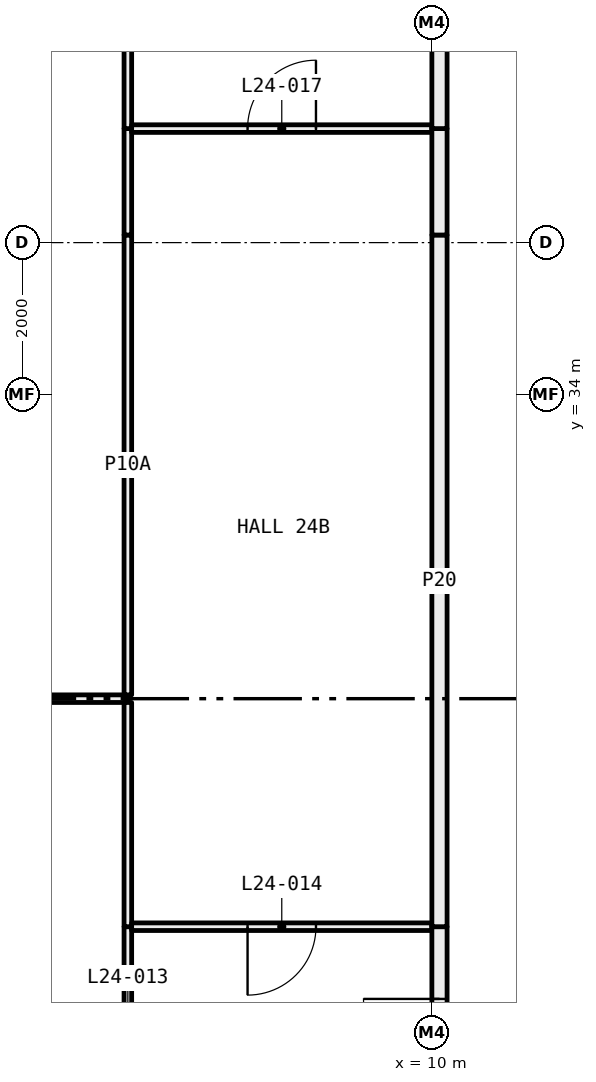
"""IFC4 building model, lengths in metres.
Left out: names, types, materials, properties, quantities, classifications, styles, units other than length and angle.
Written with IfcOpenShell. Run it as: python <this file> out.ifc"""

import sys

from ifc_helpers import new_model, si_unit, direction, frame, frame_2d, origin, place, context, subcontext, project, spatial, rectangle, extrude, element, fill, save


model = new_model("IFC4")
c1 = context("Model", 3, precision=1e-05, world=origin(), true_north=direction((0.0, 1.0)))
c2 = subcontext(c1, "Body", "Model", "MODEL_VIEW")
j1 = project(units=[si_unit("LENGTHUNIT", "METRE"), si_unit("PLANEANGLEUNIT", "RADIAN")], contexts=[c1])
p1 = place(None, origin())
s1 = spatial("IfcSite", under=j1, at=p1, CompositionType="ELEMENT")
p2 = place(p1, origin())
s2 = spatial("IfcBuilding", under=s1, at=p2, CompositionType="ELEMENT")
p3 = place(p2, frame((0.0, 0.0, 96.6)))
s3 = spatial("IfcBuildingStorey", under=s2, at=p3, CompositionType="ELEMENT", Elevation=96.6)
p4 = place(p3, frame((6.0, 30.0, 0.0), z_axis=(0.0, 0.0, 1.0), x_axis=(-1.0, 0.0, 0.0)))
e1 = element("IfcWall", 1, at=p4, inside=s3, PredefinedType="PARTITIONING", context=c2, shape_type="SweptSolid", body=[
    extrude(rectangle(XDim=5.28, YDim=0.1, at=frame_2d((2.64, 0.0))), origin(), (0.0, 0.0, 1.0), 3.05),
])
p5 = place(p4, frame((2.19, 0.0, 0.0)))
e2 = element("IfcOpeningElement", 2, at=p5, cuts=e1, PredefinedType="OPENING", context=c2, shape_type="SweptSolid", body=[
    extrude(rectangle(XDim=0.9, YDim=2.1, at=frame_2d((0.45, 1.05))), frame((0.0, 0.06, 0.0), z_axis=(0.0, -1.0, 0.0), x_axis=(1.0, 0.0, 0.0)), (0.0, 0.0, 1.0), 0.12),
])
p6 = place(p3, frame((6.0, 24.05, 0.0), z_axis=(0.0, 0.0, 1.0), x_axis=(0.0, 1.0, 0.0)))
e3 = element("IfcWall", 3, at=p6, inside=s3, PredefinedType="PARTITIONING", context=c2, shape_type="SweptSolid", body=[
    extrude(rectangle(XDim=2.95, YDim=0.1, at=frame_2d((1.475, 0.0))), origin(), (0.0, 0.0, 1.0), 2.45),
])
p7 = place(p6, frame((1.025, 0.0, 0.0)))
e4 = element("IfcOpeningElement", 4, at=p7, cuts=e3, PredefinedType="OPENING", context=c2, shape_type="SweptSolid", body=[
    extrude(rectangle(XDim=0.9, YDim=2.1, at=frame_2d((0.45, 1.05))), frame((0.0, 0.06, 0.0), z_axis=(0.0, -1.0, 0.0), x_axis=(1.0, 0.0, 0.0)), (0.0, 0.0, 1.0), 0.12),
])
p8 = place(p3, frame((6.0, 27.0, 0.0), z_axis=(0.0, 0.0, 1.0), x_axis=(0.0, 1.0, 0.0)))
e5 = element("IfcWall", 5, at=p8, inside=s3, PredefinedType="PARTITIONING", context=c2, shape_type="SweptSolid", body=[
    extrude(rectangle(XDim=2.95, YDim=0.1, at=frame_2d((1.475, 0.0))), origin(), (0.0, 0.0, 1.0), 3.05),
])
p9 = place(p3, frame((6.0, 30.05, 0.0), z_axis=(0.0, 0.0, 1.0), x_axis=(0.0, 1.0, 0.0)))
e6 = element("IfcWall", 6, at=p9, inside=s3, PredefinedType="PARTITIONING", context=c2, shape_type="SweptSolid", body=[
    extrude(rectangle(XDim=6.05, YDim=0.1, at=frame_2d((3.025, 0.0))), origin(), (0.0, 0.0, 1.0), 2.45),
])
p10 = place(p3, frame((6.0, 36.1, 0.0), z_axis=(0.0, 0.0, 1.0), x_axis=(0.0, 1.0, 0.0)))
e7 = element("IfcWall", 7, at=p10, inside=s3, PredefinedType="PARTITIONING", context=c2, shape_type="SweptSolid", body=[
    extrude(rectangle(XDim=1.4, YDim=0.1, at=frame_2d((0.7, 0.0))), origin(), (0.0, 0.0, 1.0), 3.05),
])
p11 = place(p3, frame((6.0, 37.5, 0.0), z_axis=(0.0, 0.0, 1.0), x_axis=(0.0, 1.0, 0.0)))
e8 = element("IfcWall", 8, at=p11, inside=s3, PredefinedType="PARTITIONING", context=c2, shape_type="SweptSolid", body=[
    extrude(rectangle(XDim=3.78, YDim=0.1, at=frame_2d((1.89, 0.0))), origin(), (0.0, 0.0, 1.0), 3.05),
])
p12 = place(p3, frame((10.0, 27.0, 0.0), z_axis=(0.0, 0.0, 1.0), x_axis=(-1.0, 0.0, 0.0)))
e9 = element("IfcWall", 9, at=p12, inside=s3, PredefinedType="PARTITIONING", context=c2, shape_type="SweptSolid", body=[
    extrude(rectangle(XDim=3.95, YDim=0.1, at=frame_2d((1.975, 0.0))), origin(), (0.0, 0.0, 1.0), 3.05),
])
p13 = place(p12, frame((1.525, 0.0, 0.0)))
e10 = element("IfcOpeningElement", 10, at=p13, cuts=e9, PredefinedType="OPENING", context=c2, shape_type="SweptSolid", body=[
    extrude(rectangle(XDim=0.9, YDim=2.1, at=frame_2d((0.45, 1.05))), frame((0.0, 0.06, 0.0), z_axis=(0.0, -1.0, 0.0), x_axis=(1.0, 0.0, 0.0)), (0.0, 0.0, 1.0), 0.12),
])
p14 = place(p3, frame((10.1, 24.1, 0.0), z_axis=(0.0, 0.0, 1.0), x_axis=(0.0, 1.0, 0.0)))
e11 = element("IfcWall", 11, at=p14, inside=s3, PredefinedType="PARTITIONING", context=c2, shape_type="SweptSolid", body=[
    extrude(rectangle(XDim=2.9, YDim=0.2, at=frame_2d((1.45, 0.0))), origin(), (0.0, 0.0, 1.0), 3.05),
])
p15 = place(p14, frame((0.95, 0.0, 0.0)))
e12 = element("IfcOpeningElement", 12, at=p15, cuts=e11, PredefinedType="OPENING", context=c2, shape_type="SweptSolid", body=[
    extrude(rectangle(XDim=1.0, YDim=2.1, at=frame_2d((0.5, 1.05))), frame((0.0, 0.11, 0.0), z_axis=(0.0, -1.0, 0.0), x_axis=(1.0, 0.0, 0.0)), (0.0, 0.0, 1.0), 0.22),
])
p16 = place(p3, frame((10.0, 37.5, 0.0), z_axis=(0.0, 0.0, 1.0), x_axis=(-1.0, 0.0, 0.0)))
e13 = element("IfcWall", 13, at=p16, inside=s3, PredefinedType="PARTITIONING", context=c2, shape_type="SweptSolid", body=[
    extrude(rectangle(XDim=3.95, YDim=0.1, at=frame_2d((1.975, 0.0))), origin(), (0.0, 0.0, 1.0), 3.05),
])
p17 = place(p16, frame((1.525, 0.0, 0.0)))
e14 = element("IfcOpeningElement", 14, at=p17, cuts=e13, PredefinedType="OPENING", context=c2, shape_type="SweptSolid", body=[
    extrude(rectangle(XDim=0.9, YDim=2.1, at=frame_2d((0.45, 1.05))), frame((0.0, 0.06, 0.0), z_axis=(0.0, -1.0, 0.0), x_axis=(1.0, 0.0, 0.0)), (0.0, 0.0, 1.0), 0.12),
])
p18 = place(p3, frame((10.1, 27.0, 0.0), z_axis=(0.0, 0.0, 1.0), x_axis=(0.0, 1.0, 0.0)))
e15 = element("IfcWall", 15, at=p18, inside=s3, PredefinedType="PARTITIONING", context=c2, shape_type="SweptSolid", body=[
    extrude(rectangle(XDim=9.1, YDim=0.2, at=frame_2d((4.55, 0.0))), origin(), (0.0, 0.0, 1.0), 2.45),
])
p19 = place(p3, frame((10.1, 36.1, 0.0), z_axis=(0.0, 0.0, 1.0), x_axis=(0.0, 1.0, 0.0)))
e16 = element("IfcWall", 16, at=p19, inside=s3, PredefinedType="PARTITIONING", context=c2, shape_type="SweptSolid", body=[
    extrude(rectangle(XDim=1.4, YDim=0.2, at=frame_2d((0.7, 0.0))), origin(), (0.0, 0.0, 1.0), 3.05),
])
p20 = place(p3, frame((10.1, 37.5, 0.0), z_axis=(0.0, 0.0, 1.0), x_axis=(0.0, 1.0, 0.0)))
e17 = element("IfcWall", 17, at=p20, inside=s3, PredefinedType="PARTITIONING", context=c2, shape_type="SweptSolid", body=[
    extrude(rectangle(XDim=4.4, YDim=0.2, at=frame_2d((2.2, 0.0))), origin(), (0.0, 0.0, 1.0), 3.05),
])
p21 = place(p15, origin())
e18 = element("IfcDoor", 18, at=p21, inside=s3, OperationType="SINGLE_SWING_LEFT", PredefinedType="DOOR", context=c2, shape_type="SweptSolid", body=[
    extrude(rectangle(XDim=1.0, YDim=2.1, at=frame_2d((0.5, 1.05))), frame((0.0, 0.025, 0.0), z_axis=(0.0, -1.0, 0.0), x_axis=(1.0, 0.0, 0.0)), (0.0, 0.0, 1.0), 0.05),
])
fill(e12, e18)
p22 = place(p13, origin())
e19 = element("IfcDoor", 19, at=p22, inside=s3, OperationType="SINGLE_SWING_LEFT", PredefinedType="DOOR", context=c2, shape_type="SweptSolid", body=[
    extrude(rectangle(XDim=0.9, YDim=2.1, at=frame_2d((0.45, 1.05))), frame((0.0, 0.025, 0.0), z_axis=(0.0, -1.0, 0.0), x_axis=(1.0, 0.0, 0.0)), (0.0, 0.0, 1.0), 0.05),
])
fill(e10, e19)
p23 = place(p17, frame((0.9, 0.0, 0.0), x_axis=(-1.0, 0.0, 0.0)))
e20 = element("IfcDoor", 20, at=p23, inside=s3, OperationType="SINGLE_SWING_LEFT", PredefinedType="DOOR", context=c2, shape_type="SweptSolid", body=[
    extrude(rectangle(XDim=0.9, YDim=2.1, at=frame_2d((0.45, 1.05))), frame((0.0, 0.025, 0.0), z_axis=(0.0, -1.0, 0.0), x_axis=(1.0, 0.0, 0.0)), (0.0, 0.0, 1.0), 0.05),
])
fill(e14, e20)
save(model, sys.argv[1])
